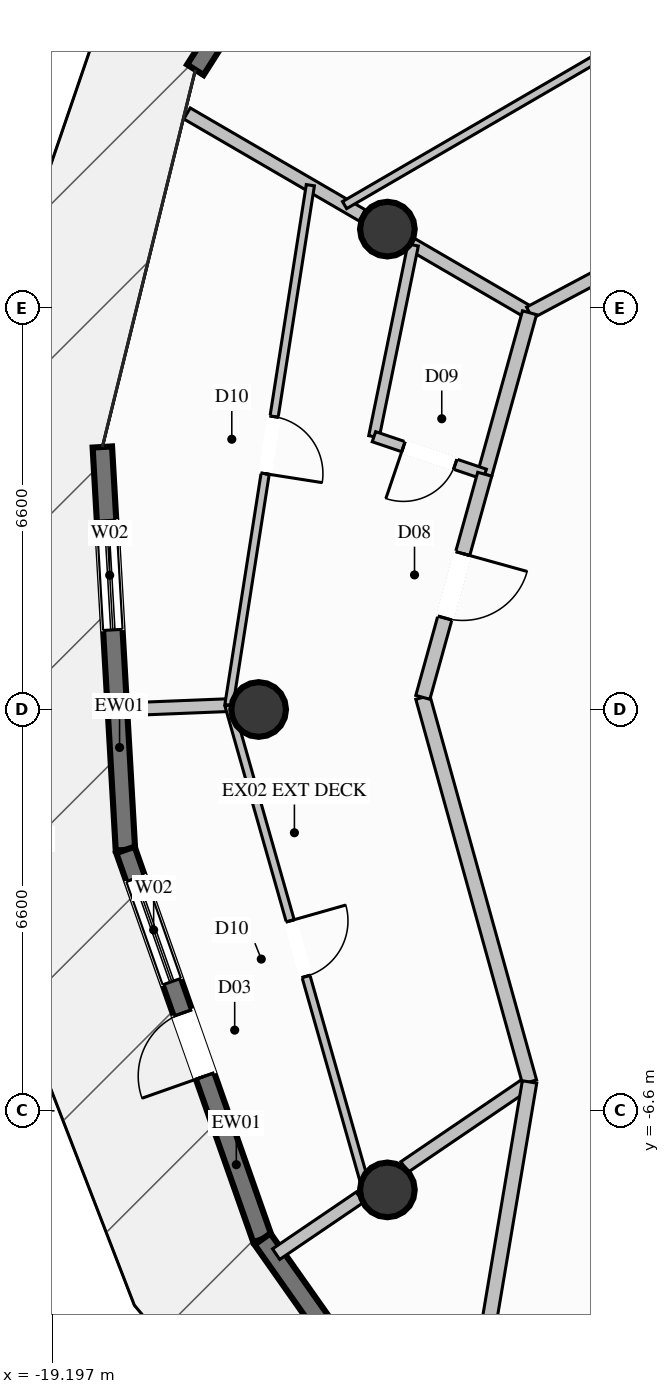
"""IFC4 building model, lengths in metres.
Left out: names, types, materials, properties, quantities, classifications, styles, units other than length and angle.
Written with IfcOpenShell. Run it as: python <this file> out.ifc"""

import sys

from ifc_helpers import new_model, si_unit, direction, frame, frame_2d, origin, origin_2d, place, context, subcontext, project, spatial, rectangle, circle, extrude, element, fill, save


model = new_model("IFC4")
c1 = context("Model", 3, precision=1e-05, world=origin(), true_north=direction((0.0, 1.0)))
c2 = subcontext(c1, "Body", "Model", "MODEL_VIEW")
j1 = project(units=[si_unit("LENGTHUNIT", "METRE"), si_unit("PLANEANGLEUNIT", "RADIAN")], contexts=[c1])
p1 = place(None, origin())
s1 = spatial("IfcSite", under=j1, at=p1, CompositionType="ELEMENT")
p2 = place(p1, origin())
s2 = spatial("IfcBuilding", under=s1, at=p2, CompositionType="ELEMENT")
p3 = place(p2, frame((0.0, 0.0, 198.4)))
s3 = spatial("IfcBuildingStorey", under=s2, at=p3, CompositionType="ELEMENT", Elevation=198.4)
for number, where, z_axis, x_axis in (
    (1, (-13.683, 7.9, 0.0), (0.0, 0.0, 1.0), (1.0, 0.0, 0.0)),
    (2, (-15.8, 0.0, 0.0), (0.0, 0.0, 1.0), (1.0, 0.0, 0.0)),
    (3, (-13.683, -7.9, 0.0), (0.0, 0.0, 1.0), (1.0, 0.0, 0.0)),
):
    element("IfcColumn", number, at=place(p3, frame(where, z_axis=z_axis, x_axis=x_axis)), inside=s3, PredefinedType="COLUMN", context=c2, shape_type="SweptSolid", body=[
        extrude(circle(Radius=0.45, at=origin_2d()), origin(), (0.0, 0.0, 1.0), 3.6),
    ])
p4 = place(p3, frame((-16.841, 10.52, 0.0), z_axis=(0.0, 0.0, 1.0), x_axis=(0.536805938934, 0.843705744869, 0.0)))
e4 = element("IfcWall", 4, at=p4, inside=s3, PredefinedType="SOLIDWALL", context=c2, shape_type="SweptSolid", body=[
    extrude(rectangle(XDim=6.133, YDim=0.32, at=frame_2d((3.066, 0.0))), origin(), (0.0, 0.0, 1.0), 3.36),
])
p5 = place(p4, frame((2.166, 0.0, 0.35)))
e5 = element("IfcOpeningElement", 5, at=p5, cuts=e4, PredefinedType="OPENING", context=c2, shape_type="SweptSolid", body=[
    extrude(rectangle(XDim=1.8, YDim=2.6, at=frame_2d((0.9, 1.3))), frame((0.0, 0.17, 0.0), z_axis=(0.0, -1.0, 0.0), x_axis=(1.0, 0.0, 0.0)), (0.0, 0.0, 1.0), 0.34),
])
p6 = place(p3, frame((-17.991, -2.309, 0.0), z_axis=(0.0, 0.0, 1.0), x_axis=(-0.057275021698, 0.998358438583, 0.0)))
e6 = element("IfcWall", 6, at=p6, inside=s3, PredefinedType="SOLIDWALL", context=c2, shape_type="SweptSolid", body=[
    extrude(rectangle(XDim=6.637, YDim=0.32, at=frame_2d((3.318, 0.0))), origin(), (0.0, 0.0, 1.0), 3.36),
])
p7 = place(p6, frame((3.624, 0.0, 0.35)))
e7 = element("IfcOpeningElement", 7, at=p7, cuts=e6, PredefinedType="OPENING", context=c2, shape_type="SweptSolid", body=[
    extrude(rectangle(XDim=1.8, YDim=2.6, at=frame_2d((0.9, 1.3))), frame((0.0, 0.17, 0.0), z_axis=(0.0, -1.0, 0.0), x_axis=(1.0, 0.0, 0.0)), (0.0, 0.0, 1.0), 0.34),
])
p8 = place(p3, frame((-15.737, -8.708, 0.0), z_axis=(0.0, 0.0, 1.0), x_axis=(-0.332225226194, 0.94320008433, 0.0)))
e8 = element("IfcWall", 8, at=p8, inside=s3, PredefinedType="SOLIDWALL", context=c2, shape_type="SweptSolid", body=[
    extrude(rectangle(XDim=6.784, YDim=0.32, at=frame_2d((3.392, 0.0))), origin(), (0.0, 0.0, 1.0), 3.36),
])
p9 = place(p8, frame((4.488, 0.0, 0.35)))
e9 = element("IfcOpeningElement", 9, at=p9, cuts=e8, PredefinedType="OPENING", context=c2, shape_type="SweptSolid", body=[
    extrude(rectangle(XDim=1.8, YDim=2.6, at=frame_2d((0.9, 1.3))), frame((0.0, 0.17, 0.0), z_axis=(0.0, -1.0, 0.0), x_axis=(1.0, 0.0, 0.0)), (0.0, 0.0, 1.0), 0.34),
])
p10 = place(p8, frame((2.842, 0.0, 0.0)))
e10 = element("IfcOpeningElement", 10, at=p10, cuts=e8, PredefinedType="OPENING", context=c2, shape_type="SweptSolid", body=[
    extrude(rectangle(XDim=1.1, YDim=2.2, at=frame_2d((0.55, 1.1))), frame((0.0, 0.17, 0.0), z_axis=(0.0, -1.0, 0.0), x_axis=(1.0, 0.0, 0.0)), (0.0, 0.0, 1.0), 0.34),
])
p11 = place(p3, frame((-11.83, -14.256, 0.0), z_axis=(0.0, 0.0, 1.0), x_axis=(-0.575766085624, 0.817614465775, 0.0)))
e11 = element("IfcWall", 11, at=p11, inside=s3, PredefinedType="SOLIDWALL", context=c2, shape_type="SweptSolid", body=[
    extrude(rectangle(XDim=6.786, YDim=0.32, at=frame_2d((3.393, 0.0))), origin(), (0.0, 0.0, 1.0), 3.36),
])
p12 = place(p11, frame((2.277, 0.0, 0.35)))
e12 = element("IfcOpeningElement", 12, at=p12, cuts=e11, PredefinedType="OPENING", context=c2, shape_type="SweptSolid", body=[
    extrude(rectangle(XDim=1.8, YDim=2.6, at=frame_2d((0.9, 1.3))), frame((0.0, 0.17, 0.0), z_axis=(0.0, -1.0, 0.0), x_axis=(1.0, 0.0, 0.0)), (0.0, 0.0, 1.0), 0.34),
])
p13 = place(p3, frame((-11.345, 6.525, 0.0), z_axis=(0.0, 0.0, 1.0), x_axis=(-0.864228712324, 0.5030991282, 0.0)))
e13 = element("IfcWall", 13, at=p13, inside=s3, PredefinedType="PARTITIONING", context=c2, shape_type="SweptSolid", body=[
    extrude(rectangle(XDim=2.242, YDim=0.21, at=frame_2d((1.121, 0.0))), origin(), (0.0, 0.0, 1.0), 2.876),
])
p14 = place(p3, frame((-14.096, 8.125, 0.0), z_axis=(0.0, 0.0, 1.0), x_axis=(-0.864328084311, 0.50292838722, 0.0)))
e14 = element("IfcWall", 14, at=p14, inside=s3, PredefinedType="PARTITIONING", context=c2, shape_type="SweptSolid", body=[
    extrude(rectangle(XDim=3.334, YDim=0.21, at=frame_2d((1.667, 0.0))), origin(), (0.0, 0.0, 1.0), 3.36),
])
p15 = place(p3, frame((-11.345, -6.125, 0.0), z_axis=(0.0, 0.0, 1.0), x_axis=(-0.827094432266, -0.562062985896, 0.0)))
e15 = element("IfcWall", 15, at=p15, inside=s3, PredefinedType="PARTITIONING", context=c2, shape_type="SweptSolid", body=[
    extrude(rectangle(XDim=2.487, YDim=0.21, at=frame_2d((1.244, 0.0))), origin(), (0.0, 0.0, 1.0), 2.876),
])
p16 = place(p3, frame((-14.137, -8.022, 0.0), z_axis=(0.0, 0.0, 1.0), x_axis=(-0.827095695336, -0.562061127242, 0.0)))
e16 = element("IfcWall", 16, at=p16, inside=s3, PredefinedType="PARTITIONING", context=c2, shape_type="SweptSolid", body=[
    extrude(rectangle(XDim=1.664, YDim=0.21, at=frame_2d((0.832, 0.0))), origin(), (0.0, 0.0, 1.0), 3.36),
])
p17 = place(p3, frame((-11.345, 6.525, 0.0), z_axis=(0.0, 0.0, 1.0), x_axis=(0.882866201619, 0.469624605445, 0.0)))
e17 = element("IfcWall", 17, at=p17, inside=s3, PredefinedType="PARTITIONING", context=c2, shape_type="SweptSolid", body=[
    extrude(rectangle(XDim=4.525, YDim=0.21, at=frame_2d((2.262, 0.0))), origin(), (0.0, 0.0, 1.0), 3.36),
])
p18 = place(p3, frame((-14.387, 8.295, 0.0), z_axis=(0.0, 0.0, 1.0), x_axis=(0.864450171357, 0.502718510939, 0.0)))
e18 = element("IfcWall", 18, at=p18, inside=s3, PredefinedType="PARTITIONING", context=c2, shape_type="SweptSolid", body=[
    extrude(rectangle(XDim=13.242, YDim=0.135, at=frame_2d((6.621, 0.0))), origin(), (0.0, 0.0, 1.0), 2.929),
])
p19 = place(p18, frame((6.146, 0.0, 0.0)))
e19 = element("IfcOpeningElement", 19, at=p19, cuts=e18, PredefinedType="OPENING", context=c2, shape_type="SweptSolid", body=[
    extrude(rectangle(XDim=0.95, YDim=2.1, at=frame_2d((0.475, 1.05))), frame((0.0, 0.078, 0.0), z_axis=(0.0, -1.0, 0.0), x_axis=(1.0, 0.0, 0.0)), (0.0, 0.0, 1.0), 0.155),
])
p20 = place(p3, frame((-11.345, 6.525, 0.0), z_axis=(0.0, 0.0, 1.0), x_axis=(-0.267401739017, -0.963585133743, 0.0)))
e20 = element("IfcWall", 20, at=p20, inside=s3, PredefinedType="PARTITIONING", context=c2, shape_type="SweptSolid", body=[
    extrude(rectangle(XDim=2.756, YDim=0.24, at=frame_2d((1.378, 0.0))), origin(), (0.0, 0.0, 1.0), 3.36),
])
p21 = place(p3, frame((-13.26, 7.639, 0.0), z_axis=(0.0, 0.0, 1.0), x_axis=(-0.200141353017, -0.979767032928, 0.0)))
e21 = element("IfcWall", 21, at=p21, inside=s3, PredefinedType="PLUMBINGWALL", context=c2, shape_type="SweptSolid", body=[
    extrude(rectangle(XDim=3.218, YDim=0.175, at=frame_2d((1.609, 0.0))), origin(), (0.0, 0.0, 1.0), 2.929),
])
p22 = place(p3, frame((-12.082, 3.869, 0.0), z_axis=(0.0, 0.0, 1.0), x_axis=(-0.947136489751, 0.320830905278, 0.0)))
e22 = element("IfcWall", 22, at=p22, inside=s3, PredefinedType="PLUMBINGWALL", context=c2, shape_type="SweptSolid", body=[
    extrude(rectangle(XDim=1.924, YDim=0.175, at=frame_2d((0.962, 0.0))), origin(), (0.0, 0.0, 1.0), 3.36),
])
p23 = place(p22, frame((0.512, 0.0, 0.0)))
e23 = element("IfcOpeningElement", 23, at=p23, cuts=e22, PredefinedType="OPENING", context=c2, shape_type="SweptSolid", body=[
    extrude(rectangle(XDim=0.9, YDim=2.1, at=frame_2d((0.45, 1.05))), frame((0.0, 0.098, 0.0), z_axis=(0.0, -1.0, 0.0), x_axis=(1.0, 0.0, 0.0)), (0.0, 0.0, 1.0), 0.195),
])
p24 = place(p3, frame((-16.289, 0.072, 0.0), z_axis=(0.0, 0.0, 1.0), x_axis=(-0.999195082929, -0.040114663781, 0.0)))
e24 = element("IfcWall", 24, at=p24, inside=s3, PredefinedType="PARTITIONING", context=c2, shape_type="SweptSolid", body=[
    extrude(rectangle(XDim=1.795, YDim=0.21, at=frame_2d((0.898, 0.0))), origin(), (0.0, 0.0, 1.0), 3.36),
])
p25 = place(p3, frame((-13.1, 0.2, 0.0), z_axis=(0.0, 0.0, 1.0), x_axis=(0.26738871748, -0.963588747218, 0.0)))
e25 = element("IfcWall", 25, at=p25, inside=s3, PredefinedType="PARTITIONING", context=c2, shape_type="SweptSolid", body=[
    extrude(rectangle(XDim=6.564, YDim=0.24, at=frame_2d((3.282, 0.0))), origin(), (0.0, 0.0, 1.0), 3.36),
])
p26 = place(p3, frame((-12.082, 3.869, 0.0), z_axis=(0.0, 0.0, 1.0), x_axis=(-0.267379290897, -0.963591362975, 0.0)))
e26 = element("IfcWall", 26, at=p26, inside=s3, PredefinedType="PARTITIONING", context=c2, shape_type="SweptSolid", body=[
    extrude(rectangle(XDim=3.808, YDim=0.24, at=frame_2d((1.904, 0.0))), origin(), (0.0, 0.0, 1.0), 3.36),
])
p27 = place(p26, frame((1.354, 0.0, 0.0)))
e27 = element("IfcOpeningElement", 27, at=p27, cuts=e26, PredefinedType="OPENING", context=c2, shape_type="SweptSolid", body=[
    extrude(rectangle(XDim=1.1, YDim=2.3, at=frame_2d((0.55, 1.15))), frame((0.0, 0.13, 0.0), z_axis=(0.0, -1.0, 0.0), x_axis=(1.0, 0.0, 0.0)), (0.0, 0.0, 1.0), 0.26),
])
p28 = place(p3, frame((-14.95, 8.622, 0.0), z_axis=(0.0, 0.0, 1.0), x_axis=(-0.154734004618, -0.98795616695, 0.0)))
e28 = element("IfcWall", 28, at=p28, inside=s3, PredefinedType="PARTITIONING", context=c2, shape_type="SweptSolid", body=[
    extrude(rectangle(XDim=8.654, YDim=0.135, at=frame_2d((4.327, 0.0))), origin(), (0.0, 0.0, 1.0), 2.929),
])
p29 = place(p28, frame((3.852, 0.0, 0.0)))
e29 = element("IfcOpeningElement", 29, at=p29, cuts=e28, PredefinedType="OPENING", context=c2, shape_type="SweptSolid", body=[
    extrude(rectangle(XDim=0.95, YDim=2.1, at=frame_2d((0.475, 1.05))), frame((0.0, 0.078, 0.0), z_axis=(0.0, -1.0, 0.0), x_axis=(1.0, 0.0, 0.0)), (0.0, 0.0, 1.0), 0.155),
])
p30 = place(p3, frame((-16.289, 0.072, 0.0), z_axis=(0.0, 0.0, 1.0), x_axis=(0.273369276922, -0.961909163297, 0.0)))
e30 = element("IfcWall", 30, at=p30, inside=s3, PredefinedType="PARTITIONING", context=c2, shape_type="SweptSolid", body=[
    extrude(rectangle(XDim=8.326, YDim=0.135, at=frame_2d((4.163, 0.0))), origin(), (0.0, 0.0, 1.0), 2.929),
])
p31 = place(p30, frame((3.688, 0.0, 0.0)))
e31 = element("IfcOpeningElement", 31, at=p31, cuts=e30, PredefinedType="OPENING", context=c2, shape_type="SweptSolid", body=[
    extrude(rectangle(XDim=0.95, YDim=2.1, at=frame_2d((0.475, 1.05))), frame((0.0, 0.078, 0.0), z_axis=(0.0, -1.0, 0.0), x_axis=(1.0, 0.0, 0.0)), (0.0, 0.0, 1.0), 0.155),
])
p32 = place(p3, frame((-11.345, -6.125, 0.0), z_axis=(0.0, 0.0, 1.0), x_axis=(-0.165960421789, -0.986132414232, 0.0)))
e32 = element("IfcWall", 32, at=p32, inside=s3, PredefinedType="PARTITIONING", context=c2, shape_type="SweptSolid", body=[
    extrude(rectangle(XDim=5.755, YDim=0.24, at=frame_2d((2.877, 0.0))), origin(), (0.0, 0.0, 1.0), 3.36),
])
p33 = place(p7, origin())
e33 = element("IfcWindow", 33, at=p33, inside=s3, PartitioningType="SINGLE_PANEL", PredefinedType="WINDOW", context=c2, shape_type="SweptSolid", body=[
    extrude(rectangle(XDim=1.8, YDim=2.6, at=frame_2d((0.9, 1.3))), frame((0.0, 0.03, 0.0), z_axis=(0.0, -1.0, 0.0), x_axis=(1.0, 0.0, 0.0)), (0.0, 0.0, 1.0), 0.06),
])
fill(e7, e33)
p34 = place(p9, origin())
e34 = element("IfcWindow", 34, at=p34, inside=s3, PartitioningType="SINGLE_PANEL", PredefinedType="WINDOW", context=c2, shape_type="SweptSolid", body=[
    extrude(rectangle(XDim=1.8, YDim=2.6, at=frame_2d((0.9, 1.3))), frame((0.0, 0.03, 0.0), z_axis=(0.0, -1.0, 0.0), x_axis=(1.0, 0.0, 0.0)), (0.0, 0.0, 1.0), 0.06),
])
fill(e9, e34)
p35 = place(p10, origin())
e35 = element("IfcDoor", 35, at=p35, inside=s3, OperationType="SINGLE_SWING_LEFT", PredefinedType="DOOR", context=c2, shape_type="SweptSolid", body=[
    extrude(rectangle(XDim=1.1, YDim=2.2, at=frame_2d((0.55, 1.1))), frame((0.0, 0.025, 0.0), z_axis=(0.0, -1.0, 0.0), x_axis=(1.0, 0.0, 0.0)), (0.0, 0.0, 1.0), 0.05),
])
fill(e10, e35)
p36 = place(p23, origin())
e36 = element("IfcDoor", 36, at=p36, inside=s3, OperationType="SINGLE_SWING_RIGHT", PredefinedType="DOOR", context=c2, shape_type="SweptSolid", body=[
    extrude(rectangle(XDim=0.9, YDim=2.1, at=frame_2d((0.45, 1.05))), frame((0.0, 0.025, 0.0), z_axis=(0.0, -1.0, 0.0), x_axis=(1.0, 0.0, 0.0)), (0.0, 0.0, 1.0), 0.05),
])
fill(e23, e36)
p37 = place(p27, origin())
e37 = element("IfcDoor", 37, at=p37, inside=s3, OperationType="SINGLE_SWING_LEFT", PredefinedType="DOOR", context=c2, shape_type="SweptSolid", body=[
    extrude(rectangle(XDim=1.1, YDim=2.3, at=frame_2d((0.55, 1.15))), frame((0.0, 0.025, 0.0), z_axis=(0.0, -1.0, 0.0), x_axis=(1.0, 0.0, 0.0)), (0.0, 0.0, 1.0), 0.05),
])
fill(e27, e37)
p38 = place(p29, origin())
e38 = element("IfcDoor", 38, at=p38, inside=s3, OperationType="SINGLE_SWING_RIGHT", PredefinedType="DOOR", context=c2, shape_type="SweptSolid", body=[
    extrude(rectangle(XDim=0.95, YDim=2.1, at=frame_2d((0.475, 1.05))), frame((0.0, 0.025, 0.0), z_axis=(0.0, -1.0, 0.0), x_axis=(1.0, 0.0, 0.0)), (0.0, 0.0, 1.0), 0.05),
])
fill(e29, e38)
p39 = place(p31, origin())
e39 = element("IfcDoor", 39, at=p39, inside=s3, OperationType="SINGLE_SWING_LEFT", PredefinedType="DOOR", context=c2, shape_type="SweptSolid", body=[
    extrude(rectangle(XDim=0.95, YDim=2.1, at=frame_2d((0.475, 1.05))), frame((0.0, 0.025, 0.0), z_axis=(0.0, -1.0, 0.0), x_axis=(1.0, 0.0, 0.0)), (0.0, 0.0, 1.0), 0.05),
])
fill(e31, e39)
save(model, sys.argv[1])
